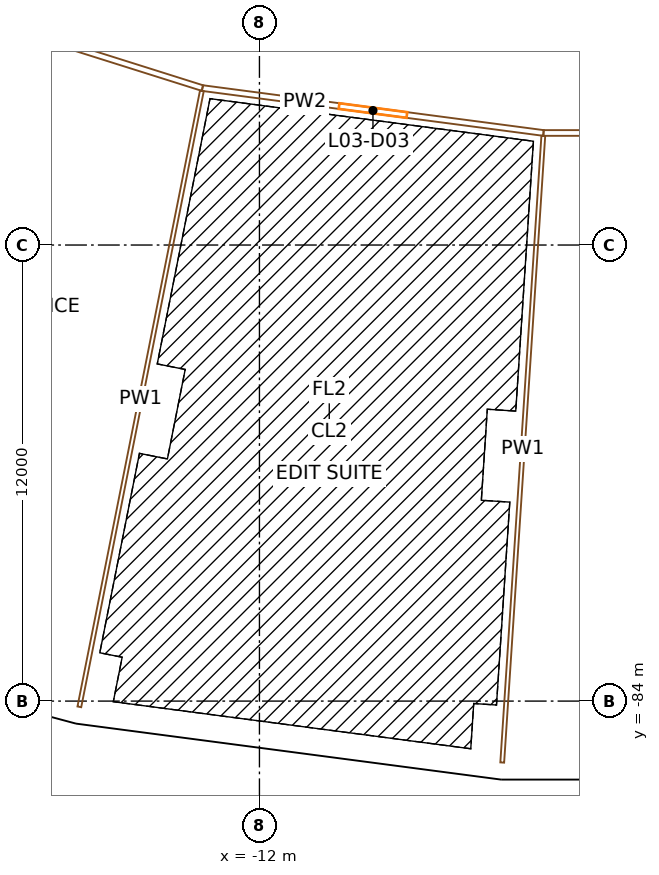
"""IFC4 building model, lengths in metres.
Left out: names, types, materials, properties, quantities, classifications, styles, units other than length and angle.
Written with IfcOpenShell. Run it as: python <this file> out.ifc"""

import sys

from ifc_helpers import new_model, si_unit, direction, frame, frame_2d, origin, origin_2d, place, context, subcontext, project, spatial, rectangle, extrude, element, fill, save


model = new_model("IFC4")
c1 = context("Model", 3, precision=1e-05, world=origin(), true_north=direction((0.0, 1.0)))
c2 = subcontext(c1, "Body", "Model", "MODEL_VIEW")
j1 = project(units=[si_unit("LENGTHUNIT", "METRE"), si_unit("PLANEANGLEUNIT", "RADIAN")], contexts=[c1])
p1 = place(None, origin())
s1 = spatial("IfcSite", under=j1, at=p1, CompositionType="ELEMENT")
p2 = place(p1, origin())
s2 = spatial("IfcBuilding", under=s1, at=p2, CompositionType="ELEMENT")
p3 = place(p2, frame((0.0, 0.0, 27.0)))
s3 = spatial("IfcBuildingStorey", under=s2, at=p3, CompositionType="ELEMENT", Elevation=27.0)
p4 = place(p3, frame((-15.168, -76.256, 0.0), z_axis=(0.0, 0.0, 1.0), x_axis=(0.980785280403, -0.195090322016, 0.0)))
e1 = element("IfcColumn", 1, at=p4, inside=s3, PredefinedType="COLUMN", context=c2, shape_type="SweptSolid", body=[
    extrude(rectangle(XDim=1.4, YDim=1.8, at=origin_2d()), origin(), (0.0, 0.0, 1.0), 4.5),
])
p5 = place(p3, frame((-16.631, -83.612, 0.0), z_axis=(0.0, 0.0, 1.0), x_axis=(0.980785280403, -0.195090322016, 0.0)))
e2 = element("IfcColumn", 2, at=p5, inside=s3, PredefinedType="COLUMN", context=c2, shape_type="SweptSolid", body=[
    extrude(rectangle(XDim=1.1, YDim=1.3, at=origin_2d()), origin(), (0.0, 0.0, 1.0), 4.5),
])
p6 = place(p3, frame((-5.085, -77.583, 0.0), z_axis=(0.0, 0.0, 1.0), x_axis=(0.997858923239, -0.06540312923, 0.0)))
e3 = element("IfcColumn", 3, at=p6, inside=s3, PredefinedType="COLUMN", context=c2, shape_type="SweptSolid", body=[
    extrude(rectangle(XDim=1.4, YDim=1.8, at=origin_2d()), origin(), (0.0, 0.0, 1.0), 4.5),
])
p7 = place(p3, frame((-5.576, -85.067, 0.0), z_axis=(0.0, 0.0, 1.0), x_axis=(0.997858923239, -0.06540312923, 0.0)))
e4 = element("IfcColumn", 4, at=p7, inside=s3, PredefinedType="COLUMN", context=c2, shape_type="SweptSolid", body=[
    extrude(rectangle(XDim=1.1, YDim=1.3, at=origin_2d()), origin(), (0.0, 0.0, 1.0), 4.5),
])
p8 = place(p3, frame((-5.656, -85.84, 0.0), z_axis=(0.0, 0.0, 1.0), x_axis=(1.0, 0.0, 0.0)))
e5 = element("IfcWall", 5, at=p8, inside=s3, PredefinedType="SOLIDWALL", context=c2, shape_type="SweptSolid", body=[
    extrude(rectangle(XDim=11.312, YDim=0.45, at=frame_2d((5.656, 0.0))), origin(), (0.0, 0.0, 1.0), 3.2),
])
p9 = place(p8, frame((4.006, 0.0, 0.9)))
e6 = element("IfcOpeningElement", 6, at=p9, cuts=e5, PredefinedType="OPENING", context=c2, shape_type="SweptSolid", body=[
    extrude(rectangle(XDim=1.2, YDim=2.15, at=frame_2d((0.6, 1.075))), frame((0.0, 0.235, 0.0), z_axis=(0.0, -1.0, 0.0), x_axis=(1.0, 0.0, 0.0)), (0.0, 0.0, 1.0), 0.47),
])
p10 = place(p8, frame((6.106, 0.0, 0.9)))
e7 = element("IfcOpeningElement", 7, at=p10, cuts=e5, PredefinedType="OPENING", context=c2, shape_type="SweptSolid", body=[
    extrude(rectangle(XDim=1.2, YDim=2.15, at=frame_2d((0.6, 1.075))), frame((0.0, 0.235, 0.0), z_axis=(0.0, -1.0, 0.0), x_axis=(1.0, 0.0, 0.0)), (0.0, 0.0, 1.0), 0.47),
])
p11 = place(p3, frame((-27.681, -81.451, 0.0), z_axis=(0.0, 0.0, 1.0), x_axis=(0.965923678926, -0.258827059038, 0.0)))
e8 = element("IfcWall", 8, at=p11, inside=s3, PredefinedType="SOLIDWALL", context=c2, shape_type="SweptSolid", body=[
    extrude(rectangle(XDim=11.312, YDim=0.45, at=frame_2d((5.656, 0.0))), origin(), (0.0, 0.0, 1.0), 3.2),
])
p12 = place(p11, frame((4.006, 0.0, 0.9)))
e9 = element("IfcOpeningElement", 9, at=p12, cuts=e8, PredefinedType="OPENING", context=c2, shape_type="SweptSolid", body=[
    extrude(rectangle(XDim=1.2, YDim=2.15, at=frame_2d((0.6, 1.075))), frame((0.0, 0.235, 0.0), z_axis=(0.0, -1.0, 0.0), x_axis=(1.0, 0.0, 0.0)), (0.0, 0.0, 1.0), 0.47),
])
p13 = place(p11, frame((6.106, 0.0, 0.9)))
e10 = element("IfcOpeningElement", 10, at=p13, cuts=e8, PredefinedType="OPENING", context=c2, shape_type="SweptSolid", body=[
    extrude(rectangle(XDim=1.2, YDim=2.15, at=frame_2d((0.6, 1.075))), frame((0.0, 0.235, 0.0), z_axis=(0.0, -1.0, 0.0), x_axis=(1.0, 0.0, 0.0)), (0.0, 0.0, 1.0), 0.47),
])
p14 = place(p3, frame((-16.724, -84.379, 0.0), z_axis=(0.0, 0.0, 1.0), x_axis=(0.991447502826, -0.130506126829, 0.0)))
e11 = element("IfcWall", 11, at=p14, inside=s3, PredefinedType="SOLIDWALL", context=c2, shape_type="SweptSolid", body=[
    extrude(rectangle(XDim=11.135, YDim=0.45, at=frame_2d((5.567, 0.0))), origin(), (0.0, 0.0, 1.0), 3.2),
])
p15 = place(p14, frame((3.917, 0.0, 0.9)))
e12 = element("IfcOpeningElement", 12, at=p15, cuts=e11, PredefinedType="OPENING", context=c2, shape_type="SweptSolid", body=[
    extrude(rectangle(XDim=1.2, YDim=2.15, at=frame_2d((0.6, 1.075))), frame((0.0, 0.235, 0.0), z_axis=(0.0, -1.0, 0.0), x_axis=(1.0, 0.0, 0.0)), (0.0, 0.0, 1.0), 0.47),
])
p16 = place(p14, frame((6.017, 0.0, 0.9)))
e13 = element("IfcOpeningElement", 13, at=p16, cuts=e11, PredefinedType="OPENING", context=c2, shape_type="SweptSolid", body=[
    extrude(rectangle(XDim=1.2, YDim=2.15, at=frame_2d((0.6, 1.075))), frame((0.0, 0.235, 0.0), z_axis=(0.0, -1.0, 0.0), x_axis=(1.0, 0.0, 0.0)), (0.0, 0.0, 1.0), 0.47),
])
p17 = place(p3, frame((-13.5, -67.87, 0.0), z_axis=(0.0, 0.0, 1.0), x_axis=(-0.953714063006, 0.300714958099, 0.0)))
e14 = element("IfcWall", 14, at=p17, inside=s3, PredefinedType="PARTITIONING", context=c2, shape_type="SweptSolid", body=[
    extrude(rectangle(XDim=15.069, YDim=0.15, at=frame_2d((7.535, 0.0))), origin(), (0.0, 0.0, 1.0), 3.1),
])
p18 = place(p17, frame((6.635, 0.0, 0.0)))
e15 = element("IfcOpeningElement", 15, at=p18, cuts=e14, PredefinedType="OPENING", context=c2, shape_type="SweptSolid", body=[
    extrude(rectangle(XDim=1.8, YDim=2.1, at=frame_2d((0.9, 1.05))), frame((0.0, 0.085, 0.0), z_axis=(0.0, -1.0, 0.0), x_axis=(1.0, 0.0, 0.0)), (0.0, 0.0, 1.0), 0.17),
])
p19 = place(p3, frame((-16.739, -84.151, 0.0), z_axis=(0.0, 0.0, 1.0), x_axis=(0.195090372882, 0.980785270285, 0.0)))
e16 = element("IfcWall", 16, at=p19, inside=s3, PredefinedType="PARTITIONING", context=c2, shape_type="SweptSolid", body=[
    extrude(rectangle(XDim=16.525, YDim=0.1, at=frame_2d((8.263, 0.0))), origin(), (0.0, 0.0, 1.0), 3.1),
])
p20 = place(p3, frame((-4.526, -69.052, 0.0), z_axis=(0.0, 0.0, 1.0), x_axis=(-0.991446306881, 0.13051521203, 0.0)))
e17 = element("IfcWall", 17, at=p20, inside=s3, PredefinedType="PARTITIONING", context=c2, shape_type="SweptSolid", body=[
    extrude(rectangle(XDim=9.052, YDim=0.15, at=frame_2d((4.526, 0.0))), origin(), (0.0, 0.0, 1.0), 3.1),
])
p21 = place(p20, frame((3.626, 0.0, 0.0)))
e18 = element("IfcOpeningElement", 18, at=p21, cuts=e17, PredefinedType="OPENING", context=c2, shape_type="SweptSolid", body=[
    extrude(rectangle(XDim=1.8, YDim=2.1, at=frame_2d((0.9, 1.05))), frame((0.0, 0.085, 0.0), z_axis=(0.0, -1.0, 0.0), x_axis=(1.0, 0.0, 0.0)), (0.0, 0.0, 1.0), 0.17),
])
p22 = place(p3, frame((-5.612, -85.616, 0.0), z_axis=(0.0, 0.0, 1.0), x_axis=(0.065405026615, 0.997858798876, 0.0)))
e19 = element("IfcWall", 19, at=p22, inside=s3, PredefinedType="PARTITIONING", context=c2, shape_type="SweptSolid", body=[
    extrude(rectangle(XDim=16.525, YDim=0.1, at=frame_2d((8.262, 0.0))), origin(), (0.0, 0.0, 1.0), 3.1),
])
p23 = place(p3, frame((4.526, -69.052, 0.0), z_axis=(0.0, 0.0, 1.0), x_axis=(-1.0, 0.0, 0.0)))
e20 = element("IfcWall", 20, at=p23, inside=s3, PredefinedType="PARTITIONING", context=c2, shape_type="SweptSolid", body=[
    extrude(rectangle(XDim=9.052, YDim=0.15, at=frame_2d((4.526, 0.0))), origin(), (0.0, 0.0, 1.0), 3.1),
])
p24 = place(p23, frame((3.626, 0.0, 0.0)))
e21 = element("IfcOpeningElement", 21, at=p24, cuts=e20, PredefinedType="OPENING", context=c2, shape_type="SweptSolid", body=[
    extrude(rectangle(XDim=1.8, YDim=2.1, at=frame_2d((0.9, 1.05))), frame((0.0, 0.085, 0.0), z_axis=(0.0, -1.0, 0.0), x_axis=(1.0, 0.0, 0.0)), (0.0, 0.0, 1.0), 0.17),
])
p25 = place(p15, origin())
e22 = element("IfcWindow", 22, at=p25, inside=s3, PartitioningType="SINGLE_PANEL", PredefinedType="WINDOW", context=c2, shape_type="SweptSolid", body=[
    extrude(rectangle(XDim=1.2, YDim=2.15, at=frame_2d((0.6, 1.075))), frame((0.0, 0.03, 0.0), z_axis=(0.0, -1.0, 0.0), x_axis=(1.0, 0.0, 0.0)), (0.0, 0.0, 1.0), 0.06),
])
fill(e12, e22)
p26 = place(p16, origin())
e23 = element("IfcWindow", 23, at=p26, inside=s3, PartitioningType="SINGLE_PANEL", PredefinedType="WINDOW", context=c2, shape_type="SweptSolid", body=[
    extrude(rectangle(XDim=1.2, YDim=2.15, at=frame_2d((0.6, 1.075))), frame((0.0, 0.03, 0.0), z_axis=(0.0, -1.0, 0.0), x_axis=(1.0, 0.0, 0.0)), (0.0, 0.0, 1.0), 0.06),
])
fill(e13, e23)
p27 = place(p21, origin())
e24 = element("IfcDoor", 24, at=p27, inside=s3, OperationType="DOUBLE_DOOR_SINGLE_SWING", PredefinedType="DOOR", context=c2, shape_type="SweptSolid", body=[
    extrude(rectangle(XDim=1.8, YDim=2.1, at=frame_2d((0.9, 1.05))), frame((0.0, 0.025, 0.0), z_axis=(0.0, -1.0, 0.0), x_axis=(1.0, 0.0, 0.0)), (0.0, 0.0, 1.0), 0.05),
])
fill(e18, e24)
save(model, sys.argv[1])
